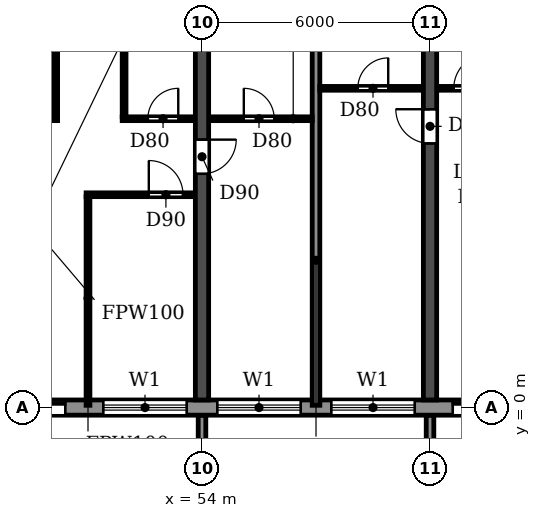
"""IFC4 building model, lengths in metres.
Left out: names, types, materials, properties, quantities, classifications, styles, units other than length and angle.
Written with IfcOpenShell. Run it as: python <this file> out.ifc"""

import sys

from ifc_helpers import new_model, si_unit, direction, frame, frame_2d, origin, place, context, subcontext, project, spatial, polyline, rectangle, outline, extrude, source, transform, mapped, element, fill, save


model = new_model("IFC4")
c1 = context("Model", 3, precision=1e-05, world=origin(), true_north=direction((0.0, 1.0)))
c2 = subcontext(c1, "Body", "Model", "MODEL_VIEW")
j1 = project(units=[si_unit("LENGTHUNIT", "METRE"), si_unit("PLANEANGLEUNIT", "RADIAN")], contexts=[c1])
p1 = place(None, origin())
s1 = spatial("IfcSite", under=j1, at=p1, CompositionType="ELEMENT")
p2 = place(p1, origin())
s2 = spatial("IfcBuilding", under=s1, at=p2, CompositionType="ELEMENT")
p3 = place(p2, frame((0.0, 0.0, 72.9)))
s3 = spatial("IfcBuildingStorey", under=s2, at=p3, CompositionType="ELEMENT", Elevation=72.9)
p4 = place(p3, frame((54.0, 0.2, 0.0), z_axis=(0.0, 0.0, 1.0), x_axis=(0.0, 1.0, 0.0)))
e1 = element("IfcWall", 1, at=p4, inside=s3, PredefinedType="SHEAR", context=c2, shape_type="SweptSolid", body=[
    extrude(rectangle(XDim=11.675, YDim=0.35, at=frame_2d((5.837, 0.0))), origin(), (0.0, 0.0, 1.0), 3.06),
])
p5 = place(p4, frame((5.95, 0.0, 0.0)))
e2 = element("IfcOpeningElement", 2, at=p5, cuts=e1, PredefinedType="OPENING", context=c2, shape_type="SweptSolid", body=[
    extrude(rectangle(XDim=0.9, YDim=2.1, at=frame_2d((0.45, 1.05))), frame((0.0, 0.185, 0.0), z_axis=(0.0, -1.0, 0.0), x_axis=(1.0, 0.0, 0.0)), (0.0, 0.0, 1.0), 0.37),
])
p6 = place(p3, frame((60.0, 0.2, 0.0), z_axis=(0.0, 0.0, 1.0), x_axis=(0.0, 1.0, 0.0)))
e3 = element("IfcWall", 3, at=p6, inside=s3, PredefinedType="SHEAR", context=c2, shape_type="SweptSolid", body=[
    extrude(rectangle(XDim=11.675, YDim=0.35, at=frame_2d((5.837, 0.0))), origin(), (0.0, 0.0, 1.0), 3.06),
])
p7 = place(p6, frame((6.75, 0.0, 0.0)))
e4 = element("IfcOpeningElement", 4, at=p7, cuts=e3, PredefinedType="OPENING", context=c2, shape_type="SweptSolid", body=[
    extrude(rectangle(XDim=0.9, YDim=2.1, at=frame_2d((0.45, 1.05))), frame((0.0, 0.185, 0.0), z_axis=(0.0, -1.0, 0.0), x_axis=(1.0, 0.0, 0.0)), (0.0, 0.0, 1.0), 0.37),
])
p8 = place(p3, frame((10.683, 0.0, 0.0), z_axis=(0.0, 0.0, 1.0), x_axis=(1.0, 0.0, 0.0)))
e5 = element("IfcWall", 5, at=p8, inside=s3, PredefinedType="STANDARD", context=c2, shape_type="SweptSolid", body=[
    extrude(rectangle(XDim=80.634, YDim=0.4, at=frame_2d((40.317, 0.0))), origin(), (0.0, 0.0, 1.0), 3.06),
])
p9 = place(p8, frame((1.717, 0.0, 0.9)))
e6 = element("IfcOpeningElement", 6, at=p9, cuts=e5, PredefinedType="OPENING", context=c2, shape_type="SweptSolid", body=[
    extrude(rectangle(XDim=2.2, YDim=1.5, at=frame_2d((1.1, 0.75))), frame((0.0, 0.21, 0.0), z_axis=(0.0, -1.0, 0.0), x_axis=(1.0, 0.0, 0.0)), (0.0, 0.0, 1.0), 0.42),
])
p10 = place(p8, frame((4.917, 0.0, 0.0)))
e7 = element("IfcOpeningElement", 7, at=p10, cuts=e5, PredefinedType="OPENING", context=c2, shape_type="SweptSolid", body=[
    extrude(rectangle(XDim=1.8, YDim=2.4, at=frame_2d((0.9, 1.2))), frame((0.0, 0.21, 0.0), z_axis=(0.0, -1.0, 0.0), x_axis=(1.0, 0.0, 0.0)), (0.0, 0.0, 1.0), 0.42),
])
p11 = place(p8, frame((7.717, 0.0, 0.9)))
e8 = element("IfcOpeningElement", 8, at=p11, cuts=e5, PredefinedType="OPENING", context=c2, shape_type="SweptSolid", body=[
    extrude(rectangle(XDim=2.2, YDim=1.5, at=frame_2d((1.1, 0.75))), frame((0.0, 0.21, 0.0), z_axis=(0.0, -1.0, 0.0), x_axis=(1.0, 0.0, 0.0)), (0.0, 0.0, 1.0), 0.42),
])
p12 = place(p8, frame((10.717, 0.0, 0.9)))
e9 = element("IfcOpeningElement", 9, at=p12, cuts=e5, PredefinedType="OPENING", context=c2, shape_type="SweptSolid", body=[
    extrude(rectangle(XDim=2.2, YDim=1.5, at=frame_2d((1.1, 0.75))), frame((0.0, 0.21, 0.0), z_axis=(0.0, -1.0, 0.0), x_axis=(1.0, 0.0, 0.0)), (0.0, 0.0, 1.0), 0.42),
])
p13 = place(p8, frame((13.717, 0.0, 0.9)))
e10 = element("IfcOpeningElement", 10, at=p13, cuts=e5, PredefinedType="OPENING", context=c2, shape_type="SweptSolid", body=[
    extrude(rectangle(XDim=2.2, YDim=1.5, at=frame_2d((1.1, 0.75))), frame((0.0, 0.21, 0.0), z_axis=(0.0, -1.0, 0.0), x_axis=(1.0, 0.0, 0.0)), (0.0, 0.0, 1.0), 0.42),
])
p14 = place(p8, frame((16.917, 0.0, 0.0)))
e11 = element("IfcOpeningElement", 11, at=p14, cuts=e5, PredefinedType="OPENING", context=c2, shape_type="SweptSolid", body=[
    extrude(rectangle(XDim=1.8, YDim=2.4, at=frame_2d((0.9, 1.2))), frame((0.0, 0.21, 0.0), z_axis=(0.0, -1.0, 0.0), x_axis=(1.0, 0.0, 0.0)), (0.0, 0.0, 1.0), 0.42),
])
p15 = place(p8, frame((19.717, 0.0, 0.9)))
e12 = element("IfcOpeningElement", 12, at=p15, cuts=e5, PredefinedType="OPENING", context=c2, shape_type="SweptSolid", body=[
    extrude(rectangle(XDim=2.2, YDim=1.5, at=frame_2d((1.1, 0.75))), frame((0.0, 0.21, 0.0), z_axis=(0.0, -1.0, 0.0), x_axis=(1.0, 0.0, 0.0)), (0.0, 0.0, 1.0), 0.42),
])
p16 = place(p8, frame((22.717, 0.0, 0.9)))
e13 = element("IfcOpeningElement", 13, at=p16, cuts=e5, PredefinedType="OPENING", context=c2, shape_type="SweptSolid", body=[
    extrude(rectangle(XDim=2.2, YDim=1.5, at=frame_2d((1.1, 0.75))), frame((0.0, 0.21, 0.0), z_axis=(0.0, -1.0, 0.0), x_axis=(1.0, 0.0, 0.0)), (0.0, 0.0, 1.0), 0.42),
])
p17 = place(p8, frame((25.917, 0.0, 0.0)))
e14 = element("IfcOpeningElement", 14, at=p17, cuts=e5, PredefinedType="OPENING", context=c2, shape_type="SweptSolid", body=[
    extrude(rectangle(XDim=1.8, YDim=2.4, at=frame_2d((0.9, 1.2))), frame((0.0, 0.21, 0.0), z_axis=(0.0, -1.0, 0.0), x_axis=(1.0, 0.0, 0.0)), (0.0, 0.0, 1.0), 0.42),
])
p18 = place(p8, frame((28.717, 0.0, 0.9)))
e15 = element("IfcOpeningElement", 15, at=p18, cuts=e5, PredefinedType="OPENING", context=c2, shape_type="SweptSolid", body=[
    extrude(rectangle(XDim=2.2, YDim=1.5, at=frame_2d((1.1, 0.75))), frame((0.0, 0.21, 0.0), z_axis=(0.0, -1.0, 0.0), x_axis=(1.0, 0.0, 0.0)), (0.0, 0.0, 1.0), 0.42),
])
p19 = place(p8, frame((31.717, 0.0, 0.9)))
e16 = element("IfcOpeningElement", 16, at=p19, cuts=e5, PredefinedType="OPENING", context=c2, shape_type="SweptSolid", body=[
    extrude(rectangle(XDim=2.2, YDim=1.5, at=frame_2d((1.1, 0.75))), frame((0.0, 0.21, 0.0), z_axis=(0.0, -1.0, 0.0), x_axis=(1.0, 0.0, 0.0)), (0.0, 0.0, 1.0), 0.42),
])
p20 = place(p8, frame((34.717, 0.0, 0.9)))
e17 = element("IfcOpeningElement", 17, at=p20, cuts=e5, PredefinedType="OPENING", context=c2, shape_type="SweptSolid", body=[
    extrude(rectangle(XDim=2.2, YDim=1.5, at=frame_2d((1.1, 0.75))), frame((0.0, 0.21, 0.0), z_axis=(0.0, -1.0, 0.0), x_axis=(1.0, 0.0, 0.0)), (0.0, 0.0, 1.0), 0.42),
])
p21 = place(p8, frame((37.917, 0.0, 0.0)))
e18 = element("IfcOpeningElement", 18, at=p21, cuts=e5, PredefinedType="OPENING", context=c2, shape_type="SweptSolid", body=[
    extrude(rectangle(XDim=1.8, YDim=2.4, at=frame_2d((0.9, 1.2))), frame((0.0, 0.21, 0.0), z_axis=(0.0, -1.0, 0.0), x_axis=(1.0, 0.0, 0.0)), (0.0, 0.0, 1.0), 0.42),
])
p22 = place(p8, frame((40.717, 0.0, 0.9)))
e19 = element("IfcOpeningElement", 19, at=p22, cuts=e5, PredefinedType="OPENING", context=c2, shape_type="SweptSolid", body=[
    extrude(rectangle(XDim=2.2, YDim=1.5, at=frame_2d((1.1, 0.75))), frame((0.0, 0.21, 0.0), z_axis=(0.0, -1.0, 0.0), x_axis=(1.0, 0.0, 0.0)), (0.0, 0.0, 1.0), 0.42),
])
p23 = place(p8, frame((43.717, 0.0, 0.9)))
e20 = element("IfcOpeningElement", 20, at=p23, cuts=e5, PredefinedType="OPENING", context=c2, shape_type="SweptSolid", body=[
    extrude(rectangle(XDim=2.2, YDim=1.5, at=frame_2d((1.1, 0.75))), frame((0.0, 0.21, 0.0), z_axis=(0.0, -1.0, 0.0), x_axis=(1.0, 0.0, 0.0)), (0.0, 0.0, 1.0), 0.42),
])
p24 = place(p8, frame((46.717, 0.0, 0.9)))
e21 = element("IfcOpeningElement", 21, at=p24, cuts=e5, PredefinedType="OPENING", context=c2, shape_type="SweptSolid", body=[
    extrude(rectangle(XDim=2.2, YDim=1.5, at=frame_2d((1.1, 0.75))), frame((0.0, 0.21, 0.0), z_axis=(0.0, -1.0, 0.0), x_axis=(1.0, 0.0, 0.0)), (0.0, 0.0, 1.0), 0.42),
])
p25 = place(p8, frame((49.917, 0.0, 0.0)))
e22 = element("IfcOpeningElement", 22, at=p25, cuts=e5, PredefinedType="OPENING", context=c2, shape_type="SweptSolid", body=[
    extrude(rectangle(XDim=1.8, YDim=2.4, at=frame_2d((0.9, 1.2))), frame((0.0, 0.21, 0.0), z_axis=(0.0, -1.0, 0.0), x_axis=(1.0, 0.0, 0.0)), (0.0, 0.0, 1.0), 0.42),
])
p26 = place(p8, frame((52.717, 0.0, 0.9)))
e23 = element("IfcOpeningElement", 23, at=p26, cuts=e5, PredefinedType="OPENING", context=c2, shape_type="SweptSolid", body=[
    extrude(rectangle(XDim=2.2, YDim=1.5, at=frame_2d((1.1, 0.75))), frame((0.0, 0.21, 0.0), z_axis=(0.0, -1.0, 0.0), x_axis=(1.0, 0.0, 0.0)), (0.0, 0.0, 1.0), 0.42),
])
p27 = place(p8, frame((55.717, 0.0, 0.9)))
e24 = element("IfcOpeningElement", 24, at=p27, cuts=e5, PredefinedType="OPENING", context=c2, shape_type="SweptSolid", body=[
    extrude(rectangle(XDim=2.2, YDim=1.5, at=frame_2d((1.1, 0.75))), frame((0.0, 0.21, 0.0), z_axis=(0.0, -1.0, 0.0), x_axis=(1.0, 0.0, 0.0)), (0.0, 0.0, 1.0), 0.42),
])
p28 = place(p8, frame((58.717, 0.0, 0.9)))
e25 = element("IfcOpeningElement", 25, at=p28, cuts=e5, PredefinedType="OPENING", context=c2, shape_type="SweptSolid", body=[
    extrude(rectangle(XDim=2.2, YDim=1.5, at=frame_2d((1.1, 0.75))), frame((0.0, 0.21, 0.0), z_axis=(0.0, -1.0, 0.0), x_axis=(1.0, 0.0, 0.0)), (0.0, 0.0, 1.0), 0.42),
])
p29 = place(p8, frame((61.717, 0.0, 0.9)))
e26 = element("IfcOpeningElement", 26, at=p29, cuts=e5, PredefinedType="OPENING", context=c2, shape_type="SweptSolid", body=[
    extrude(rectangle(XDim=2.2, YDim=1.5, at=frame_2d((1.1, 0.75))), frame((0.0, 0.21, 0.0), z_axis=(0.0, -1.0, 0.0), x_axis=(1.0, 0.0, 0.0)), (0.0, 0.0, 1.0), 0.42),
])
p30 = place(p8, frame((64.917, 0.0, 0.0)))
e27 = element("IfcOpeningElement", 27, at=p30, cuts=e5, PredefinedType="OPENING", context=c2, shape_type="SweptSolid", body=[
    extrude(rectangle(XDim=1.8, YDim=2.4, at=frame_2d((0.9, 1.2))), frame((0.0, 0.21, 0.0), z_axis=(0.0, -1.0, 0.0), x_axis=(1.0, 0.0, 0.0)), (0.0, 0.0, 1.0), 0.42),
])
p31 = place(p8, frame((67.717, 0.0, 0.9)))
e28 = element("IfcOpeningElement", 28, at=p31, cuts=e5, PredefinedType="OPENING", context=c2, shape_type="SweptSolid", body=[
    extrude(rectangle(XDim=2.2, YDim=1.5, at=frame_2d((1.1, 0.75))), frame((0.0, 0.21, 0.0), z_axis=(0.0, -1.0, 0.0), x_axis=(1.0, 0.0, 0.0)), (0.0, 0.0, 1.0), 0.42),
])
p32 = place(p8, frame((70.717, 0.0, 0.9)))
e29 = element("IfcOpeningElement", 29, at=p32, cuts=e5, PredefinedType="OPENING", context=c2, shape_type="SweptSolid", body=[
    extrude(rectangle(XDim=2.2, YDim=1.5, at=frame_2d((1.1, 0.75))), frame((0.0, 0.21, 0.0), z_axis=(0.0, -1.0, 0.0), x_axis=(1.0, 0.0, 0.0)), (0.0, 0.0, 1.0), 0.42),
])
p33 = place(p8, frame((73.917, 0.0, 0.0)))
e30 = element("IfcOpeningElement", 30, at=p33, cuts=e5, PredefinedType="OPENING", context=c2, shape_type="SweptSolid", body=[
    extrude(rectangle(XDim=1.8, YDim=2.4, at=frame_2d((0.9, 1.2))), frame((0.0, 0.21, 0.0), z_axis=(0.0, -1.0, 0.0), x_axis=(1.0, 0.0, 0.0)), (0.0, 0.0, 1.0), 0.42),
])
p34 = place(p8, frame((76.717, 0.0, 0.9)))
e31 = element("IfcOpeningElement", 31, at=p34, cuts=e5, PredefinedType="OPENING", context=c2, shape_type="SweptSolid", body=[
    extrude(rectangle(XDim=2.2, YDim=1.5, at=frame_2d((1.1, 0.75))), frame((0.0, 0.21, 0.0), z_axis=(0.0, -1.0, 0.0), x_axis=(1.0, 0.0, 0.0)), (0.0, 0.0, 1.0), 0.42),
])
m1 = source(origin(), c2, "Body", "SweptSolid", [
    extrude(outline(polyline([(0.0, 0.0), (0.2, 0.0), (0.2, 1.65), (0.0, 1.65), (0.0, 0.0)])), origin(), (0.0, 0.0, 1.0), 3.1),
])
for number, where in (
    (32, (53.9, -1.85, 0.0)),
    (33, (59.9, -1.85, 0.0)),
):
    element("IfcWall", number, at=place(p3, frame(where)), inside=s3, PredefinedType="STANDARD", context=c2, shape_type="MappedRepresentation", body=[
        mapped(m1, transform((0.0, 0.0, 0.0))),
    ])
p35 = place(p3, frame((57.0, 0.06, 0.0), z_axis=(0.0, 0.0, 1.0), x_axis=(0.0, 1.0, 0.0)))
e34 = element("IfcWall", 34, at=p35, inside=s3, PredefinedType="PARTITIONING", context=c2, shape_type="SweptSolid", body=[
    extrude(rectangle(XDim=11.805, YDim=0.2, at=frame_2d((5.902, 0.0))), origin(), (0.0, 0.0, 1.0), 3.06),
])
p36 = place(p3, frame((50.95, 5.6, 0.0), z_axis=(0.0, 0.0, 1.0), x_axis=(1.0, 0.0, 0.0)))
e35 = element("IfcWall", 35, at=p36, inside=s3, PredefinedType="PARTITIONING", context=c2, shape_type="SweptSolid", body=[
    extrude(rectangle(XDim=2.865, YDim=0.1, at=frame_2d((1.433, 0.0))), origin(), (0.0, 0.0, 1.0), 3.06),
])
p37 = place(p36, frame((1.65, 0.0, 0.0)))
e36 = element("IfcOpeningElement", 36, at=p37, cuts=e35, PredefinedType="OPENING", context=c2, shape_type="SweptSolid", body=[
    extrude(rectangle(XDim=0.9, YDim=2.1, at=frame_2d((0.45, 1.05))), frame((0.0, 0.06, 0.0), z_axis=(0.0, -1.0, 0.0), x_axis=(1.0, 0.0, 0.0)), (0.0, 0.0, 1.0), 0.12),
])
p38 = place(p3, frame((48.185, 7.6, 0.0), z_axis=(0.0, 0.0, 1.0), x_axis=(1.0, 0.0, 0.0)))
e37 = element("IfcWall", 37, at=p38, inside=s3, PredefinedType="PARTITIONING", context=c2, shape_type="SweptSolid", body=[
    extrude(rectangle(XDim=2.015, YDim=0.1, at=frame_2d((1.007, 0.0))), origin(), (0.0, 0.0, 1.0), 3.06),
])
p39 = place(p38, frame((0.44, 0.0, 0.0)))
e38 = element("IfcOpeningElement", 38, at=p39, cuts=e37, PredefinedType="OPENING", context=c2, shape_type="SweptSolid", body=[
    extrude(rectangle(XDim=0.9, YDim=2.1, at=frame_2d((0.45, 1.05))), frame((0.0, 0.06, 0.0), z_axis=(0.0, -1.0, 0.0), x_axis=(1.0, 0.0, 0.0)), (0.0, 0.0, 1.0), 0.12),
])
p40 = place(p3, frame((51.9, 7.6, 0.0), z_axis=(0.0, 0.0, 1.0), x_axis=(1.0, 0.0, 0.0)))
e39 = element("IfcWall", 39, at=p40, inside=s3, PredefinedType="PARTITIONING", context=c2, shape_type="SweptSolid", body=[
    extrude(rectangle(XDim=1.915, YDim=0.1, at=frame_2d((0.958, 0.0))), origin(), (0.0, 0.0, 1.0), 3.06),
])
p41 = place(p40, frame((0.675, 0.0, 0.0)))
e40 = element("IfcOpeningElement", 40, at=p41, cuts=e39, PredefinedType="OPENING", context=c2, shape_type="SweptSolid", body=[
    extrude(rectangle(XDim=0.8, YDim=2.1, at=frame_2d((0.4, 1.05))), frame((0.0, 0.06, 0.0), z_axis=(0.0, -1.0, 0.0), x_axis=(1.0, 0.0, 0.0)), (0.0, 0.0, 1.0), 0.12),
])
p42 = place(p3, frame((54.185, 7.6, 0.0), z_axis=(0.0, 0.0, 1.0), x_axis=(1.0, 0.0, 0.0)))
e41 = element("IfcWall", 41, at=p42, inside=s3, PredefinedType="PARTITIONING", context=c2, shape_type="SweptSolid", body=[
    extrude(rectangle(XDim=2.715, YDim=0.1, at=frame_2d((1.357, 0.0))), origin(), (0.0, 0.0, 1.0), 3.06),
])
p43 = place(p42, frame((0.915, 0.0, 0.0)))
e42 = element("IfcOpeningElement", 42, at=p43, cuts=e41, PredefinedType="OPENING", context=c2, shape_type="SweptSolid", body=[
    extrude(rectangle(XDim=0.8, YDim=2.1, at=frame_2d((0.4, 1.05))), frame((0.0, 0.06, 0.0), z_axis=(0.0, -1.0, 0.0), x_axis=(1.0, 0.0, 0.0)), (0.0, 0.0, 1.0), 0.12),
])
p44 = place(p3, frame((57.1, 8.4, 0.0), z_axis=(0.0, 0.0, 1.0), x_axis=(1.0, 0.0, 0.0)))
e43 = element("IfcWall", 43, at=p44, inside=s3, PredefinedType="PARTITIONING", context=c2, shape_type="SweptSolid", body=[
    extrude(rectangle(XDim=2.715, YDim=0.1, at=frame_2d((1.357, 0.0))), origin(), (0.0, 0.0, 1.0), 3.06),
])
p45 = place(p44, frame((1.0, 0.0, 0.0)))
e44 = element("IfcOpeningElement", 44, at=p45, cuts=e43, PredefinedType="OPENING", context=c2, shape_type="SweptSolid", body=[
    extrude(rectangle(XDim=0.8, YDim=2.1, at=frame_2d((0.4, 1.05))), frame((0.0, 0.06, 0.0), z_axis=(0.0, -1.0, 0.0), x_axis=(1.0, 0.0, 0.0)), (0.0, 0.0, 1.0), 0.12),
])
p46 = place(p3, frame((60.185, 8.4, 0.0), z_axis=(0.0, 0.0, 1.0), x_axis=(1.0, 0.0, 0.0)))
e45 = element("IfcWall", 45, at=p46, inside=s3, PredefinedType="PARTITIONING", context=c2, shape_type="SweptSolid", body=[
    extrude(rectangle(XDim=2.015, YDim=0.1, at=frame_2d((1.007, 0.0))), origin(), (0.0, 0.0, 1.0), 3.06),
])
p47 = place(p46, frame((0.44, 0.0, 0.0)))
e46 = element("IfcOpeningElement", 46, at=p47, cuts=e45, PredefinedType="OPENING", context=c2, shape_type="SweptSolid", body=[
    extrude(rectangle(XDim=0.9, YDim=2.1, at=frame_2d((0.45, 1.05))), frame((0.0, 0.06, 0.0), z_axis=(0.0, -1.0, 0.0), x_axis=(1.0, 0.0, 0.0)), (0.0, 0.0, 1.0), 0.12),
])
p48 = place(p3, frame((50.15, 7.65, 0.0), z_axis=(0.0, 0.0, 1.0), x_axis=(0.0, 1.0, 0.0)))
e47 = element("IfcWall", 47, at=p48, inside=s3, PredefinedType="PARTITIONING", context=c2, shape_type="SweptSolid", body=[
    extrude(rectangle(XDim=4.215, YDim=0.1, at=frame_2d((2.107, 0.0))), origin(), (0.0, 0.0, 1.0), 3.06),
])
p49 = place(p3, frame((51.0, 0.06, 0.0), z_axis=(0.0, 0.0, 1.0), x_axis=(0.0, 1.0, 0.0)))
e48 = element("IfcWall", 48, at=p49, inside=s3, PredefinedType="PARTITIONING", context=c2, shape_type="SweptSolid", body=[
    extrude(rectangle(XDim=5.49, YDim=0.1, at=frame_2d((2.745, 0.0))), origin(), (0.0, 0.0, 1.0), 3.06),
])
p50 = place(p3, frame((51.95, 7.65, 0.0), z_axis=(0.0, 0.0, 1.0), x_axis=(0.0, 1.0, 0.0)))
e49 = element("IfcWall", 49, at=p50, inside=s3, PredefinedType="PARTITIONING", context=c2, shape_type="SweptSolid", body=[
    extrude(rectangle(XDim=4.215, YDim=0.1, at=frame_2d((2.107, 0.0))), origin(), (0.0, 0.0, 1.0), 3.06),
])
p51 = place(p21, origin())
e50 = element("IfcDoor", 50, at=p51, inside=s3, OperationType="DOUBLE_DOOR_SLIDING", PredefinedType="DOOR", context=c2, shape_type="SweptSolid", body=[
    extrude(rectangle(XDim=1.8, YDim=2.4, at=frame_2d((0.9, 1.2))), frame((0.0, 0.025, 0.0), z_axis=(0.0, -1.0, 0.0), x_axis=(1.0, 0.0, 0.0)), (0.0, 0.0, 1.0), 0.05),
])
fill(e18, e50)
p52 = place(p22, origin())
e51 = element("IfcWindow", 51, at=p52, inside=s3, PartitioningType="DOUBLE_PANEL_HORIZONTAL", PredefinedType="WINDOW", context=c2, shape_type="SweptSolid", body=[
    extrude(rectangle(XDim=2.2, YDim=1.5, at=frame_2d((1.1, 0.75))), frame((0.0, 0.03, 0.0), z_axis=(0.0, -1.0, 0.0), x_axis=(1.0, 0.0, 0.0)), (0.0, 0.0, 1.0), 0.06),
])
fill(e19, e51)
p53 = place(p23, origin())
e52 = element("IfcWindow", 52, at=p53, inside=s3, PartitioningType="DOUBLE_PANEL_HORIZONTAL", PredefinedType="WINDOW", context=c2, shape_type="SweptSolid", body=[
    extrude(rectangle(XDim=2.2, YDim=1.5, at=frame_2d((1.1, 0.75))), frame((0.0, 0.03, 0.0), z_axis=(0.0, -1.0, 0.0), x_axis=(1.0, 0.0, 0.0)), (0.0, 0.0, 1.0), 0.06),
])
fill(e20, e52)
p54 = place(p24, origin())
e53 = element("IfcWindow", 53, at=p54, inside=s3, PartitioningType="DOUBLE_PANEL_HORIZONTAL", PredefinedType="WINDOW", context=c2, shape_type="SweptSolid", body=[
    extrude(rectangle(XDim=2.2, YDim=1.5, at=frame_2d((1.1, 0.75))), frame((0.0, 0.03, 0.0), z_axis=(0.0, -1.0, 0.0), x_axis=(1.0, 0.0, 0.0)), (0.0, 0.0, 1.0), 0.06),
])
fill(e21, e53)
p55 = place(p25, origin())
e54 = element("IfcDoor", 54, at=p55, inside=s3, OperationType="DOUBLE_DOOR_SLIDING", PredefinedType="DOOR", context=c2, shape_type="SweptSolid", body=[
    extrude(rectangle(XDim=1.8, YDim=2.4, at=frame_2d((0.9, 1.2))), frame((0.0, 0.025, 0.0), z_axis=(0.0, -1.0, 0.0), x_axis=(1.0, 0.0, 0.0)), (0.0, 0.0, 1.0), 0.05),
])
fill(e22, e54)
p56 = place(p43, origin())
e55 = element("IfcDoor", 55, at=p56, inside=s3, OperationType="SINGLE_SWING_LEFT", PredefinedType="DOOR", context=c2, shape_type="SweptSolid", body=[
    extrude(rectangle(XDim=0.8, YDim=2.1, at=frame_2d((0.4, 1.05))), frame((0.0, 0.025, 0.0), z_axis=(0.0, -1.0, 0.0), x_axis=(1.0, 0.0, 0.0)), (0.0, 0.0, 1.0), 0.05),
])
fill(e42, e55)
p57 = place(p41, origin())
e56 = element("IfcDoor", 56, at=p57, inside=s3, OperationType="SINGLE_SWING_RIGHT", PredefinedType="DOOR", context=c2, shape_type="SweptSolid", body=[
    extrude(rectangle(XDim=0.8, YDim=2.1, at=frame_2d((0.4, 1.05))), frame((0.0, 0.025, 0.0), z_axis=(0.0, -1.0, 0.0), x_axis=(1.0, 0.0, 0.0)), (0.0, 0.0, 1.0), 0.05),
])
fill(e40, e56)
p58 = place(p37, origin())
e57 = element("IfcDoor", 57, at=p58, inside=s3, OperationType="SINGLE_SWING_LEFT", PredefinedType="DOOR", context=c2, shape_type="SweptSolid", body=[
    extrude(rectangle(XDim=0.9, YDim=2.1, at=frame_2d((0.45, 1.05))), frame((0.0, 0.025, 0.0), z_axis=(0.0, -1.0, 0.0), x_axis=(1.0, 0.0, 0.0)), (0.0, 0.0, 1.0), 0.05),
])
fill(e36, e57)
p59 = place(p5, frame((0.9, 0.0, 0.0), z_axis=(0.0, 0.0, 1.0), x_axis=(-1.0, 0.0, 0.0)))
e58 = element("IfcDoor", 58, at=p59, inside=s3, OperationType="SINGLE_SWING_LEFT", PredefinedType="DOOR", context=c2, shape_type="SweptSolid", body=[
    extrude(rectangle(XDim=0.9, YDim=2.1, at=frame_2d((0.45, 1.05))), frame((0.0, 0.025, 0.0), z_axis=(0.0, -1.0, 0.0), x_axis=(1.0, 0.0, 0.0)), (0.0, 0.0, 1.0), 0.05),
])
fill(e2, e58)
p60 = place(p45, origin())
e59 = element("IfcDoor", 59, at=p60, inside=s3, OperationType="SINGLE_SWING_RIGHT", PredefinedType="DOOR", context=c2, shape_type="SweptSolid", body=[
    extrude(rectangle(XDim=0.8, YDim=2.1, at=frame_2d((0.4, 1.05))), frame((0.0, 0.025, 0.0), z_axis=(0.0, -1.0, 0.0), x_axis=(1.0, 0.0, 0.0)), (0.0, 0.0, 1.0), 0.05),
])
fill(e44, e59)
p61 = place(p7, origin())
e60 = element("IfcDoor", 60, at=p61, inside=s3, OperationType="SINGLE_SWING_RIGHT", PredefinedType="DOOR", context=c2, shape_type="SweptSolid", body=[
    extrude(rectangle(XDim=0.9, YDim=2.1, at=frame_2d((0.45, 1.05))), frame((0.0, 0.025, 0.0), z_axis=(0.0, -1.0, 0.0), x_axis=(1.0, 0.0, 0.0)), (0.0, 0.0, 1.0), 0.05),
])
fill(e4, e60)
p62 = place(p47, origin())
e61 = element("IfcDoor", 61, at=p62, inside=s3, OperationType="SINGLE_SWING_RIGHT", PredefinedType="DOOR", context=c2, shape_type="SweptSolid", body=[
    extrude(rectangle(XDim=0.9, YDim=2.1, at=frame_2d((0.45, 1.05))), frame((0.0, 0.025, 0.0), z_axis=(0.0, -1.0, 0.0), x_axis=(1.0, 0.0, 0.0)), (0.0, 0.0, 1.0), 0.05),
])
fill(e46, e61)
save(model, sys.argv[1])
